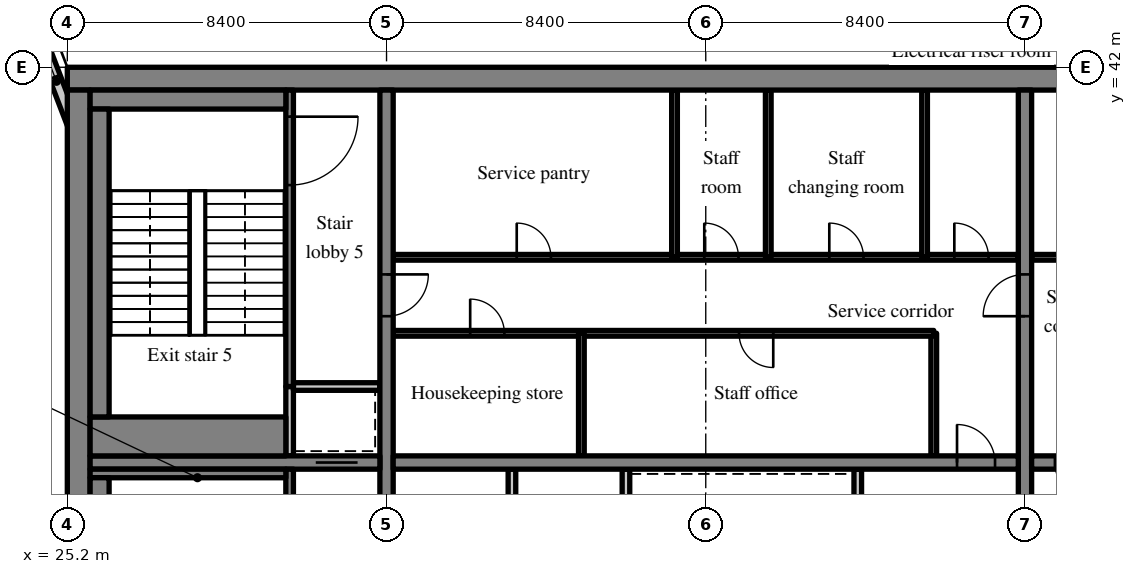
"""IFC4 building model, lengths in metres.
Left out: names, types, materials, properties, quantities, classifications, styles, units other than length and angle.
Written with IfcOpenShell. Run it as: python <this file> out.ifc"""

import sys

from ifc_helpers import new_model, si_unit, direction, frame, frame_2d, origin, place, context, subcontext, project, spatial, rectangle, extrude, source, transform, mapped, element, fill, save


model = new_model("IFC4")
c1 = context("Model", 3, precision=1e-05, world=origin(), true_north=direction((0.0, 1.0)))
c2 = subcontext(c1, "Body", "Model", "MODEL_VIEW")
j1 = project(units=[si_unit("LENGTHUNIT", "METRE"), si_unit("PLANEANGLEUNIT", "RADIAN")], contexts=[c1])
p1 = place(None, origin())
s1 = spatial("IfcSite", under=j1, at=p1, CompositionType="ELEMENT")
p2 = place(p1, origin())
s2 = spatial("IfcBuilding", under=s1, at=p2, CompositionType="ELEMENT")
p3 = place(p2, frame((0.0, 0.0, 217.9)))
s3 = spatial("IfcBuildingStorey", under=s2, at=p3, CompositionType="ELEMENT", Elevation=217.9)
m1 = source(origin(), c2, "Body", "SweptSolid", [
    extrude(rectangle(XDim=50.4, YDim=0.6, at=frame_2d((25.2, 0.0))), origin(), (0.0, 0.0, 1.0), 3.62),
])
p4 = place(p3, frame((25.2, 41.7, 0.0), z_axis=(0.0, 0.0, 1.0), x_axis=(1.0, 0.0, 0.0)))
e1 = element("IfcWall", 1, at=p4, inside=s3, PredefinedType="SHEAR", context=c2, shape_type="MappedRepresentation", body=[
    mapped(m1, transform((0.0, 0.0, 0.0), scale=1.0)),
])
m2 = source(origin(), c2, "Body", "SweptSolid", [
    extrude(rectangle(XDim=18.8, YDim=0.6, at=frame_2d((9.4, 0.0))), origin(), (0.0, 0.0, 1.0), 3.62),
])
p5 = place(p3, frame((25.5, 22.6, 0.0), z_axis=(0.0, 0.0, 1.0), x_axis=(0.0, 1.0, 0.0)))
e2 = element("IfcWall", 2, at=p5, inside=s3, PredefinedType="SHEAR", context=c2, shape_type="MappedRepresentation", body=[
    mapped(m2, transform((0.0, 0.0, 0.0), scale=1.0)),
])
m3 = source(origin(), c2, "Body", "SweptSolid", [
    extrude(rectangle(XDim=18.8, YDim=0.35, at=frame_2d((9.4, 0.0))), origin(), (0.0, 0.0, 1.0), 3.62),
])
p6 = place(p3, frame((33.6, 22.6, 0.0), z_axis=(0.0, 0.0, 1.0), x_axis=(0.0, 1.0, 0.0)))
e3 = element("IfcWall", 3, at=p6, inside=s3, PredefinedType="SHEAR", context=c2, shape_type="MappedRepresentation", body=[
    mapped(m3, transform((0.0, 0.0, 0.0), scale=1.0)),
])
m4 = source(origin(), c2, "Body", "SweptSolid", [
    extrude(rectangle(XDim=1.1, YDim=2.1, at=frame_2d((0.55, 1.05))), frame((0.0, 0.185, 0.0), z_axis=(0.0, -1.0, 0.0), x_axis=(1.0, 0.0, 0.0)), (0.0, 0.0, 1.0), 0.37),
])
p7 = place(p6, frame((12.85, 0.0, 0.0)))
e4 = element("IfcOpeningElement", 4, at=p7, cuts=e3, PredefinedType="OPENING", context=c2, shape_type="MappedRepresentation", body=[
    mapped(m4, transform((0.0, 0.0, 0.0), scale=1.0)),
])
p8 = place(p3, frame((50.4, 22.6, 0.0), z_axis=(0.0, 0.0, 1.0), x_axis=(0.0, 1.0, 0.0)))
e5 = element("IfcWall", 5, at=p8, inside=s3, PredefinedType="SHEAR", context=c2, shape_type="MappedRepresentation", body=[
    mapped(m3, transform((0.0, 0.0, 0.0), scale=1.0)),
])
p9 = place(p8, frame((12.85, 0.0, 0.0)))
e6 = element("IfcOpeningElement", 6, at=p9, cuts=e5, PredefinedType="OPENING", context=c2, shape_type="MappedRepresentation", body=[
    mapped(m4, transform((0.0, 0.0, 0.0), scale=1.0)),
])
m5 = source(origin(), c2, "Body", "SweptSolid", [
    extrude(rectangle(XDim=7.625, YDim=0.35, at=frame_2d((3.812, 0.0))), origin(), (0.0, 0.0, 1.0), 3.62),
])
p10 = place(p3, frame((25.8, 31.6, 0.0), z_axis=(0.0, 0.0, 1.0), x_axis=(1.0, 0.0, 0.0)))
e7 = element("IfcWall", 7, at=p10, inside=s3, PredefinedType="SHEAR", context=c2, shape_type="MappedRepresentation", body=[
    mapped(m5, transform((0.0, 0.0, 0.0), scale=1.0)),
])
p11 = place(p10, frame((5.938, 0.0, 0.0)))
e8 = element("IfcOpeningElement", 8, at=p11, cuts=e7, PredefinedType="OPENING", context=c2, shape_type="MappedRepresentation", body=[
    mapped(m4, transform((0.0, 0.0, 0.0), scale=1.0)),
])
m6 = source(origin(), c2, "Body", "SweptSolid", [
    extrude(rectangle(XDim=16.45, YDim=0.35, at=frame_2d((8.225, 0.0))), origin(), (0.0, 0.0, 1.0), 3.62),
])
p12 = place(p3, frame((33.775, 31.6, 0.0), z_axis=(0.0, 0.0, 1.0), x_axis=(1.0, 0.0, 0.0)))
e9 = element("IfcWall", 9, at=p12, inside=s3, PredefinedType="SHEAR", context=c2, shape_type="MappedRepresentation", body=[
    mapped(m6, transform((0.0, 0.0, 0.0), scale=1.0)),
])
m7 = source(origin(), c2, "Body", "SweptSolid", [
    extrude(rectangle(XDim=1.0, YDim=2.1, at=frame_2d((0.5, 1.05))), frame((0.0, 0.185, 0.0), z_axis=(0.0, -1.0, 0.0), x_axis=(1.0, 0.0, 0.0)), (0.0, 0.0, 1.0), 0.37),
])
p13 = place(p12, frame((14.837, 0.0, 0.0)))
e10 = element("IfcOpeningElement", 10, at=p13, cuts=e9, PredefinedType="OPENING", context=c2, shape_type="MappedRepresentation", body=[
    mapped(m7, transform((0.0, 0.0, 0.0), scale=1.0)),
])
m8 = source(origin(), c2, "Body", "SweptSolid", [
    extrude(rectangle(XDim=16.45, YDim=0.35, at=frame_2d((8.225, 0.0))), origin(), (0.0, 0.0, 1.0), 3.62),
])
p14 = place(p3, frame((50.575, 31.6, 0.0), z_axis=(0.0, 0.0, 1.0), x_axis=(1.0, 0.0, 0.0)))
e11 = element("IfcWall", 11, at=p14, inside=s3, PredefinedType="SHEAR", context=c2, shape_type="MappedRepresentation", body=[
    mapped(m8, transform((0.0, 0.0, 0.0), scale=1.0)),
])
p15 = place(p14, frame((0.613, 0.0, 0.0)))
e12 = element("IfcOpeningElement", 12, at=p15, cuts=e11, PredefinedType="OPENING", context=c2, shape_type="MappedRepresentation", body=[
    mapped(m7, transform((0.0, 0.0, 0.0), scale=1.0)),
])
m9 = source(origin(), c2, "Body", "SweptSolid", [
    extrude(rectangle(XDim=3.559, YDim=0.3, at=frame_2d((1.78, 0.0))), origin(), (0.0, 0.0, 1.0), 3.62),
])
p16 = place(p3, frame((25.55, 39.969, 0.0), z_axis=(0.0, 0.0, 1.0), x_axis=(-0.35779745313, 0.933799219604, 0.0)))
e13 = element("IfcWall", 13, at=p16, inside=s3, PredefinedType="SOLIDWALL", context=c2, shape_type="MappedRepresentation", body=[
    mapped(m9, transform((0.0, 0.0, 0.0), scale=1.0)),
])
m10 = source(origin(), c2, "Body", "SweptSolid", [
    extrude(rectangle(XDim=1.5, YDim=2.0, at=frame_2d((0.75, 1.0))), frame((0.0, 0.16, 0.0), z_axis=(0.0, -1.0, 0.0), x_axis=(1.0, 0.0, 0.0)), (0.0, 0.0, 1.0), 0.32),
])
p17 = place(p16, frame((1.903, 0.0, 0.9)))
e14 = element("IfcOpeningElement", 14, at=p17, cuts=e13, PredefinedType="OPENING", context=c2, shape_type="MappedRepresentation", body=[
    mapped(m10, transform((0.0, 0.0, 0.0), scale=1.0)),
])
m11 = source(origin(), c2, "Body", "SweptSolid", [
    extrude(rectangle(XDim=8.825, YDim=0.2, at=frame_2d((4.413, 0.0))), origin(), (0.0, 0.0, 1.0), 3.62),
])
p18 = place(p3, frame((39.9, 22.6, 0.0), z_axis=(0.0, 0.0, 1.0), x_axis=(0.0, 1.0, 0.0)))
e15 = element("IfcWall", 15, at=p18, inside=s3, PredefinedType="PARTITIONING", context=c2, shape_type="MappedRepresentation", body=[
    mapped(m11, transform((0.0, 0.0, 0.0), scale=1.0)),
])
m12 = source(origin(), c2, "Body", "SweptSolid", [
    extrude(rectangle(XDim=0.9, YDim=2.1, at=frame_2d((0.45, 1.05))), frame((0.0, 0.11, 0.0), z_axis=(0.0, -1.0, 0.0), x_axis=(1.0, 0.0, 0.0)), (0.0, 0.0, 1.0), 0.22),
])
p19 = place(p18, frame((3.95, 0.0, 0.0)))
e16 = element("IfcOpeningElement", 16, at=p19, cuts=e15, PredefinedType="OPENING", context=c2, shape_type="MappedRepresentation", body=[
    mapped(m12, transform((0.0, 0.0, 0.0), scale=1.0)),
])
m13 = source(origin(), c2, "Body", "SweptSolid", [
    extrude(rectangle(XDim=2.625, YDim=0.2, at=frame_2d((1.312, 0.0))), origin(), (0.0, 0.0, 1.0), 3.62),
])
p20 = place(p3, frame((46.0, 28.8, 0.0), z_axis=(0.0, 0.0, 1.0), x_axis=(0.0, 1.0, 0.0)))
e17 = element("IfcWall", 17, at=p20, inside=s3, PredefinedType="SOLIDWALL", context=c2, shape_type="MappedRepresentation", body=[
    mapped(m13, transform((0.0, 0.0, 0.0), scale=1.0)),
])
p21 = place(p3, frame((36.9, 22.6, 0.0), z_axis=(0.0, 0.0, 1.0), x_axis=(0.0, 1.0, 0.0)))
e18 = element("IfcWall", 18, at=p21, inside=s3, PredefinedType="PARTITIONING", context=c2, shape_type="MappedRepresentation", body=[
    mapped(m11, transform((0.0, 0.0, 0.0), scale=1.0)),
])
m14 = source(origin(), c2, "Body", "SweptSolid", [
    extrude(rectangle(XDim=3.225, YDim=0.15, at=frame_2d((1.613, 0.0))), origin(), (0.0, 0.0, 1.0), 3.62),
])
p22 = place(p3, frame((48.0, 31.775, 0.0), z_axis=(0.0, 0.0, 1.0), x_axis=(0.0, 1.0, 0.0)))
e19 = element("IfcWall", 19, at=p22, inside=s3, PredefinedType="PARTITIONING", context=c2, shape_type="MappedRepresentation", body=[
    mapped(m14, transform((0.0, 0.0, 0.0), scale=1.0)),
])
m15 = source(origin(), c2, "Body", "SweptSolid", [
    extrude(rectangle(XDim=14.225, YDim=0.15, at=frame_2d((7.113, 0.0))), origin(), (0.0, 0.0, 1.0), 3.62),
])
p23 = place(p3, frame((33.775, 35.0, 0.0), z_axis=(0.0, 0.0, 1.0), x_axis=(1.0, 0.0, 0.0)))
e20 = element("IfcWall", 20, at=p23, inside=s3, PredefinedType="PARTITIONING", context=c2, shape_type="MappedRepresentation", body=[
    mapped(m15, transform((0.0, 0.0, 0.0), scale=1.0)),
])
m16 = source(origin(), c2, "Body", "SweptSolid", [
    extrude(rectangle(XDim=0.9, YDim=2.1, at=frame_2d((0.45, 1.05))), frame((0.0, 0.085, 0.0), z_axis=(0.0, -1.0, 0.0), x_axis=(1.0, 0.0, 0.0)), (0.0, 0.0, 1.0), 0.17),
])
p24 = place(p23, frame((2.026, 0.0, 0.0)))
e21 = element("IfcOpeningElement", 21, at=p24, cuts=e20, PredefinedType="OPENING", context=c2, shape_type="MappedRepresentation", body=[
    mapped(m16, transform((0.0, 0.0, 0.0), scale=1.0)),
])
p25 = place(p23, frame((9.101, 0.0, 0.0)))
e22 = element("IfcOpeningElement", 22, at=p25, cuts=e20, PredefinedType="OPENING", context=c2, shape_type="MappedRepresentation", body=[
    mapped(m16, transform((0.0, 0.0, 0.0), scale=1.0)),
])
m17 = source(origin(), c2, "Body", "SweptSolid", [
    extrude(rectangle(XDim=16.45, YDim=0.15, at=frame_2d((8.225, 0.0))), origin(), (0.0, 0.0, 1.0), 3.62),
])
p26 = place(p3, frame((33.775, 37.0, 0.0), z_axis=(0.0, 0.0, 1.0), x_axis=(1.0, 0.0, 0.0)))
e23 = element("IfcWall", 23, at=p26, inside=s3, PredefinedType="PARTITIONING", context=c2, shape_type="MappedRepresentation", body=[
    mapped(m17, transform((0.0, 0.0, 0.0), scale=1.0)),
])
p27 = place(p26, frame((3.251, 0.0, 0.0)))
e24 = element("IfcOpeningElement", 24, at=p27, cuts=e23, PredefinedType="OPENING", context=c2, shape_type="MappedRepresentation", body=[
    mapped(m16, transform((0.0, 0.0, 0.0), scale=1.0)),
])
p28 = place(p26, frame((8.186, 0.0, 0.0)))
e25 = element("IfcOpeningElement", 25, at=p28, cuts=e23, PredefinedType="OPENING", context=c2, shape_type="MappedRepresentation", body=[
    mapped(m16, transform((0.0, 0.0, 0.0), scale=1.0)),
])
p29 = place(p26, frame((11.476, 0.0, 0.0)))
e26 = element("IfcOpeningElement", 26, at=p29, cuts=e23, PredefinedType="OPENING", context=c2, shape_type="MappedRepresentation", body=[
    mapped(m16, transform((0.0, 0.0, 0.0), scale=1.0)),
])
p30 = place(p26, frame((14.766, 0.0, 0.0)))
e27 = element("IfcOpeningElement", 27, at=p30, cuts=e23, PredefinedType="OPENING", context=c2, shape_type="MappedRepresentation", body=[
    mapped(m16, transform((0.0, 0.0, 0.0), scale=1.0)),
])
p31 = place(p3, frame((38.727, 31.775, 0.0), z_axis=(0.0, 0.0, 1.0), x_axis=(0.0, 1.0, 0.0)))
e28 = element("IfcWall", 28, at=p31, inside=s3, PredefinedType="PARTITIONING", context=c2, shape_type="MappedRepresentation", body=[
    mapped(m14, transform((0.0, 0.0, 0.0), scale=1.0)),
])
m18 = source(origin(), c2, "Body", "SweptSolid", [
    extrude(rectangle(XDim=4.4, YDim=0.15, at=frame_2d((2.2, 0.0))), origin(), (0.0, 0.0, 1.0), 3.62),
])
for number, where, z_axis, x_axis in (
    (29, (41.178, 37.0, 0.0), (0.0, 0.0, 1.0), (0.0, 1.0, 0.0)),
    (30, (43.645, 37.0, 0.0), (0.0, 0.0, 1.0), (0.0, 1.0, 0.0)),
    (31, (47.758, 37.0, 0.0), (0.0, 0.0, 1.0), (0.0, 1.0, 0.0)),
):
    element("IfcWall", number, at=place(p3, frame(where, z_axis=z_axis, x_axis=x_axis)), inside=s3, PredefinedType="PARTITIONING", context=c2, shape_type="MappedRepresentation", body=[
        mapped(m18, transform((0.0, 0.0, 0.0), scale=1.0)),
    ])
m19 = source(origin(), c2, "Body", "SweptSolid", [
    extrude(rectangle(XDim=16.45, YDim=0.15, at=frame_2d((8.225, 0.0))), origin(), (0.0, 0.0, 1.0), 3.62),
])
p32 = place(p3, frame((67.025, 37.0, 0.0), z_axis=(0.0, 0.0, 1.0), x_axis=(-1.0, 0.0, 0.0)))
e32 = element("IfcWall", 32, at=p32, inside=s3, PredefinedType="PARTITIONING", context=c2, shape_type="MappedRepresentation", body=[
    mapped(m19, transform((0.0, 0.0, 0.0), scale=1.0)),
])
p33 = place(p32, frame((0.784, 0.0, 0.0)))
e33 = element("IfcOpeningElement", 33, at=p33, cuts=e32, PredefinedType="OPENING", context=c2, shape_type="MappedRepresentation", body=[
    mapped(m16, transform((0.0, 0.0, 0.0), scale=1.0)),
])
p34 = place(p32, frame((3.663, 0.0, 0.0)))
e34 = element("IfcOpeningElement", 34, at=p34, cuts=e32, PredefinedType="OPENING", context=c2, shape_type="MappedRepresentation", body=[
    mapped(m16, transform((0.0, 0.0, 0.0), scale=1.0)),
])
p35 = place(p32, frame((9.42, 0.0, 0.0)))
e35 = element("IfcOpeningElement", 35, at=p35, cuts=e32, PredefinedType="OPENING", context=c2, shape_type="MappedRepresentation", body=[
    mapped(m16, transform((0.0, 0.0, 0.0), scale=1.0)),
])
p36 = place(p32, frame((14.766, 0.0, 0.0)))
e36 = element("IfcOpeningElement", 36, at=p36, cuts=e32, PredefinedType="OPENING", context=c2, shape_type="MappedRepresentation", body=[
    mapped(m16, transform((0.0, 0.0, 0.0), scale=1.0)),
])
m20 = source(origin(), c2, "Body", "SweptSolid", [
    extrude(rectangle(XDim=8.825, YDim=0.2, at=frame_2d((4.413, 0.0))), origin(), (0.0, 0.0, 1.0), 3.62),
])
p37 = place(p3, frame((31.05, 22.6, 0.0), z_axis=(0.0, 0.0, 1.0), x_axis=(0.0, 1.0, 0.0)))
e37 = element("IfcWall", 37, at=p37, inside=s3, PredefinedType="SOLIDWALL", context=c2, shape_type="MappedRepresentation", body=[
    mapped(m20, transform((0.0, 0.0, 0.0), scale=1.0)),
])
m21 = source(origin(), c2, "Body", "SweptSolid", [
    extrude(rectangle(XDim=1.2, YDim=2.1, at=frame_2d((0.6, 1.05))), frame((0.0, 0.11, 0.0), z_axis=(0.0, -1.0, 0.0), x_axis=(1.0, 0.0, 0.0)), (0.0, 0.0, 1.0), 0.22),
])
p38 = place(p37, frame((6.9, 0.0, 0.0)))
e38 = element("IfcOpeningElement", 38, at=p38, cuts=e37, PredefinedType="OPENING", context=c2, shape_type="MappedRepresentation", body=[
    mapped(m21, transform((0.0, 0.0, 0.0), scale=1.0)),
])
m22 = source(origin(), c2, "Body", "SweptSolid", [
    extrude(rectangle(XDim=1.825, YDim=0.2, at=frame_2d((0.913, 0.0))), origin(), (0.0, 0.0, 1.0), 3.62),
])
p39 = place(p3, frame((31.05, 31.775, 0.0), z_axis=(0.0, 0.0, 1.0), x_axis=(0.0, 1.0, 0.0)))
e39 = element("IfcWall", 39, at=p39, inside=s3, PredefinedType="SOLIDWALL", context=c2, shape_type="MappedRepresentation", body=[
    mapped(m22, transform((0.0, 0.0, 0.0), scale=1.0)),
])
m23 = source(origin(), c2, "Body", "SweptSolid", [
    extrude(rectangle(XDim=2.275, YDim=0.2, at=frame_2d((1.138, 0.0))), origin(), (0.0, 0.0, 1.0), 3.62),
])
p40 = place(p3, frame((31.15, 33.6, 0.0), z_axis=(0.0, 0.0, 1.0), x_axis=(1.0, 0.0, 0.0)))
e40 = element("IfcWall", 40, at=p40, inside=s3, PredefinedType="SOLIDWALL", context=c2, shape_type="MappedRepresentation", body=[
    mapped(m23, transform((0.0, 0.0, 0.0), scale=1.0)),
])
m24 = source(origin(), c2, "Body", "SweptSolid", [
    extrude(rectangle(XDim=7.8, YDim=0.2, at=frame_2d((3.9, 0.0))), origin(), (0.0, 0.0, 1.0), 3.62),
])
p41 = place(p3, frame((31.05, 33.6, 0.0), z_axis=(0.0, 0.0, 1.0), x_axis=(0.0, 1.0, 0.0)))
e41 = element("IfcWall", 41, at=p41, inside=s3, PredefinedType="SOLIDWALL", context=c2, shape_type="MappedRepresentation", body=[
    mapped(m24, transform((0.0, 0.0, 0.0), scale=1.0)),
])
m25 = source(origin(), c2, "Body", "SweptSolid", [
    extrude(rectangle(XDim=1.8, YDim=2.1, at=frame_2d((0.9, 1.05))), frame((0.0, 0.11, 0.0), z_axis=(0.0, -1.0, 0.0), x_axis=(1.0, 0.0, 0.0)), (0.0, 0.0, 1.0), 0.22),
])
p42 = place(p41, frame((5.3, 0.0, 0.0)))
e42 = element("IfcOpeningElement", 42, at=p42, cuts=e41, PredefinedType="OPENING", context=c2, shape_type="MappedRepresentation", body=[
    mapped(m25, transform((0.0, 0.0, 0.0), scale=1.0)),
])
m26 = source(origin(), c2, "Body", "SweptSolid", [
    extrude(rectangle(XDim=5.15, YDim=0.225, at=frame_2d((2.575, 0.0))), origin(), (0.0, 0.0, 1.0), 3.62),
])
p43 = place(p3, frame((25.8, 31.312, 0.0), z_axis=(0.0, 0.0, 1.0), x_axis=(1.0, 0.0, 0.0)))
e43 = element("IfcWall", 43, at=p43, inside=s3, PredefinedType="SOLIDWALL", context=c2, shape_type="MappedRepresentation", body=[
    mapped(m26, transform((0.0, 0.0, 0.0), scale=1.0)),
])
m27 = source(origin(), c2, "Body", "SweptSolid", [
    extrude(rectangle(XDim=8.1, YDim=0.5, at=frame_2d((4.05, 0.0))), origin(), (0.0, 0.0, 1.0), 3.62),
])
p44 = place(p3, frame((26.05, 23.1, 0.0), z_axis=(0.0, 0.0, 1.0), x_axis=(0.0, 1.0, 0.0)))
e44 = element("IfcWall", 44, at=p44, inside=s3, PredefinedType="SOLIDWALL", context=c2, shape_type="MappedRepresentation", body=[
    mapped(m27, transform((0.0, 0.0, 0.0), scale=1.0)),
])
m28 = source(origin(), c2, "Body", "SweptSolid", [
    extrude(rectangle(XDim=5.15, YDim=0.5, at=frame_2d((2.575, 0.0))), origin(), (0.0, 0.0, 1.0), 3.62),
])
p45 = place(p3, frame((25.8, 41.15, 0.0), z_axis=(0.0, 0.0, 1.0), x_axis=(1.0, 0.0, 0.0)))
e45 = element("IfcWall", 45, at=p45, inside=s3, PredefinedType="SOLIDWALL", context=c2, shape_type="MappedRepresentation", body=[
    mapped(m28, transform((0.0, 0.0, 0.0), scale=1.0)),
])
m29 = source(origin(), c2, "Body", "SweptSolid", [
    extrude(rectangle(XDim=5.15, YDim=1.025, at=frame_2d((2.575, 0.0))), origin(), (0.0, 0.0, 1.0), 3.62),
])
p46 = place(p3, frame((25.8, 32.287, 0.0), z_axis=(0.0, 0.0, 1.0), x_axis=(1.0, 0.0, 0.0)))
e46 = element("IfcWall", 46, at=p46, inside=s3, PredefinedType="SOLIDWALL", context=c2, shape_type="MappedRepresentation", body=[
    mapped(m29, transform((0.0, 0.0, 0.0), scale=1.0)),
])
p47 = place(p3, frame((26.05, 32.8, 0.0), z_axis=(0.0, 0.0, 1.0), x_axis=(0.0, 1.0, 0.0)))
e47 = element("IfcWall", 47, at=p47, inside=s3, PredefinedType="SOLIDWALL", context=c2, shape_type="MappedRepresentation", body=[
    mapped(m27, transform((0.0, 0.0, 0.0), scale=1.0)),
])
m30 = source(origin(), c2, "Body", "SweptSolid", [
    extrude(rectangle(XDim=1.5, YDim=2.0, at=frame_2d((0.75, 1.0))), frame((0.0, 0.03, 0.0), z_axis=(0.0, -1.0, 0.0), x_axis=(1.0, 0.0, 0.0)), (0.0, 0.0, 1.0), 0.06),
])
p48 = place(p17, origin())
e48 = element("IfcWindow", 48, at=p48, inside=s3, PartitioningType="SINGLE_PANEL", PredefinedType="WINDOW", context=c2, shape_type="MappedRepresentation", body=[
    mapped(m30, transform((0.0, 0.0, 0.0), scale=1.0)),
])
fill(e14, e48)
m31 = source(origin(), c2, "Body", "SweptSolid", [
    extrude(rectangle(XDim=1.0, YDim=2.1, at=frame_2d((0.5, 1.05))), frame((0.0, 0.025, 0.0), z_axis=(0.0, -1.0, 0.0), x_axis=(1.0, 0.0, 0.0)), (0.0, 0.0, 1.0), 0.05),
])
p49 = place(p13, origin())
e49 = element("IfcDoor", 49, at=p49, inside=s3, OperationType="SINGLE_SWING_LEFT", PredefinedType="DOOR", context=c2, shape_type="MappedRepresentation", body=[
    mapped(m31, transform((0.0, 0.0, 0.0), scale=1.0)),
])
fill(e10, e49)
m32 = source(origin(), c2, "Body", "SweptSolid", [
    extrude(rectangle(XDim=0.9, YDim=2.1, at=frame_2d((0.45, 1.05))), frame((0.0, 0.025, 0.0), z_axis=(0.0, -1.0, 0.0), x_axis=(1.0, 0.0, 0.0)), (0.0, 0.0, 1.0), 0.05),
])
p50 = place(p24, origin())
e50 = element("IfcDoor", 50, at=p50, inside=s3, OperationType="SINGLE_SWING_LEFT", PredefinedType="DOOR", context=c2, shape_type="MappedRepresentation", body=[
    mapped(m32, transform((0.0, 0.0, 0.0), scale=1.0)),
])
fill(e21, e50)
p51 = place(p25, origin())
e51 = element("IfcDoor", 51, at=p51, inside=s3, OperationType="SINGLE_SWING_RIGHT", PredefinedType="DOOR", context=c2, shape_type="MappedRepresentation", body=[
    mapped(m32, transform((0.0, 0.0, 0.0), scale=1.0)),
])
fill(e22, e51)
p52 = place(p27, origin())
e52 = element("IfcDoor", 52, at=p52, inside=s3, OperationType="SINGLE_SWING_LEFT", PredefinedType="DOOR", context=c2, shape_type="MappedRepresentation", body=[
    mapped(m32, transform((0.0, 0.0, 0.0), scale=1.0)),
])
fill(e24, e52)
p53 = place(p28, origin())
e53 = element("IfcDoor", 53, at=p53, inside=s3, OperationType="SINGLE_SWING_LEFT", PredefinedType="DOOR", context=c2, shape_type="MappedRepresentation", body=[
    mapped(m32, transform((0.0, 0.0, 0.0), scale=1.0)),
])
fill(e25, e53)
p54 = place(p29, origin())
e54 = element("IfcDoor", 54, at=p54, inside=s3, OperationType="SINGLE_SWING_LEFT", PredefinedType="DOOR", context=c2, shape_type="MappedRepresentation", body=[
    mapped(m32, transform((0.0, 0.0, 0.0), scale=1.0)),
])
fill(e26, e54)
p55 = place(p30, origin())
e55 = element("IfcDoor", 55, at=p55, inside=s3, OperationType="SINGLE_SWING_LEFT", PredefinedType="DOOR", context=c2, shape_type="MappedRepresentation", body=[
    mapped(m32, transform((0.0, 0.0, 0.0), scale=1.0)),
])
fill(e27, e55)
p56 = place(p15, origin())
e56 = element("IfcDoor", 56, at=p56, inside=s3, OperationType="SINGLE_SWING_RIGHT", PredefinedType="DOOR", context=c2, shape_type="MappedRepresentation", body=[
    mapped(m31, transform((0.0, 0.0, 0.0), scale=1.0)),
])
fill(e12, e56)
m33 = source(origin(), c2, "Body", "SweptSolid", [
    extrude(rectangle(XDim=1.1, YDim=2.1, at=frame_2d((0.55, 1.05))), frame((0.0, 0.025, 0.0), z_axis=(0.0, -1.0, 0.0), x_axis=(1.0, 0.0, 0.0)), (0.0, 0.0, 1.0), 0.05),
])
p57 = place(p11, origin())
e57 = element("IfcDoor", 57, at=p57, inside=s3, OperationType="SLIDING_TO_LEFT", PredefinedType="DOOR", context=c2, shape_type="MappedRepresentation", body=[
    mapped(m33, transform((0.0, 0.0, 0.0), scale=1.0)),
])
fill(e8, e57)
m34 = source(origin(), c2, "Body", "SweptSolid", [
    extrude(rectangle(XDim=1.8, YDim=2.1, at=frame_2d((0.9, 1.05))), frame((0.0, 0.025, 0.0), z_axis=(0.0, -1.0, 0.0), x_axis=(1.0, 0.0, 0.0)), (0.0, 0.0, 1.0), 0.05),
])
p58 = place(p42, origin())
e58 = element("IfcDoor", 58, at=p58, inside=s3, OperationType="SINGLE_SWING_RIGHT", PredefinedType="DOOR", context=c2, shape_type="MappedRepresentation", body=[
    mapped(m34, transform((0.0, 0.0, 0.0), scale=1.0)),
])
fill(e42, e58)
p59 = place(p7, origin())
e59 = element("IfcDoor", 59, at=p59, inside=s3, OperationType="SINGLE_SWING_RIGHT", PredefinedType="DOOR", context=c2, shape_type="MappedRepresentation", body=[
    mapped(m33, transform((0.0, 0.0, 0.0), scale=1.0)),
])
fill(e4, e59)
p60 = place(p9, origin())
e60 = element("IfcDoor", 60, at=p60, inside=s3, OperationType="SINGLE_SWING_LEFT", PredefinedType="DOOR", context=c2, shape_type="MappedRepresentation", body=[
    mapped(m33, transform((0.0, 0.0, 0.0), scale=1.0)),
])
fill(e6, e60)
save(model, sys.argv[1])
